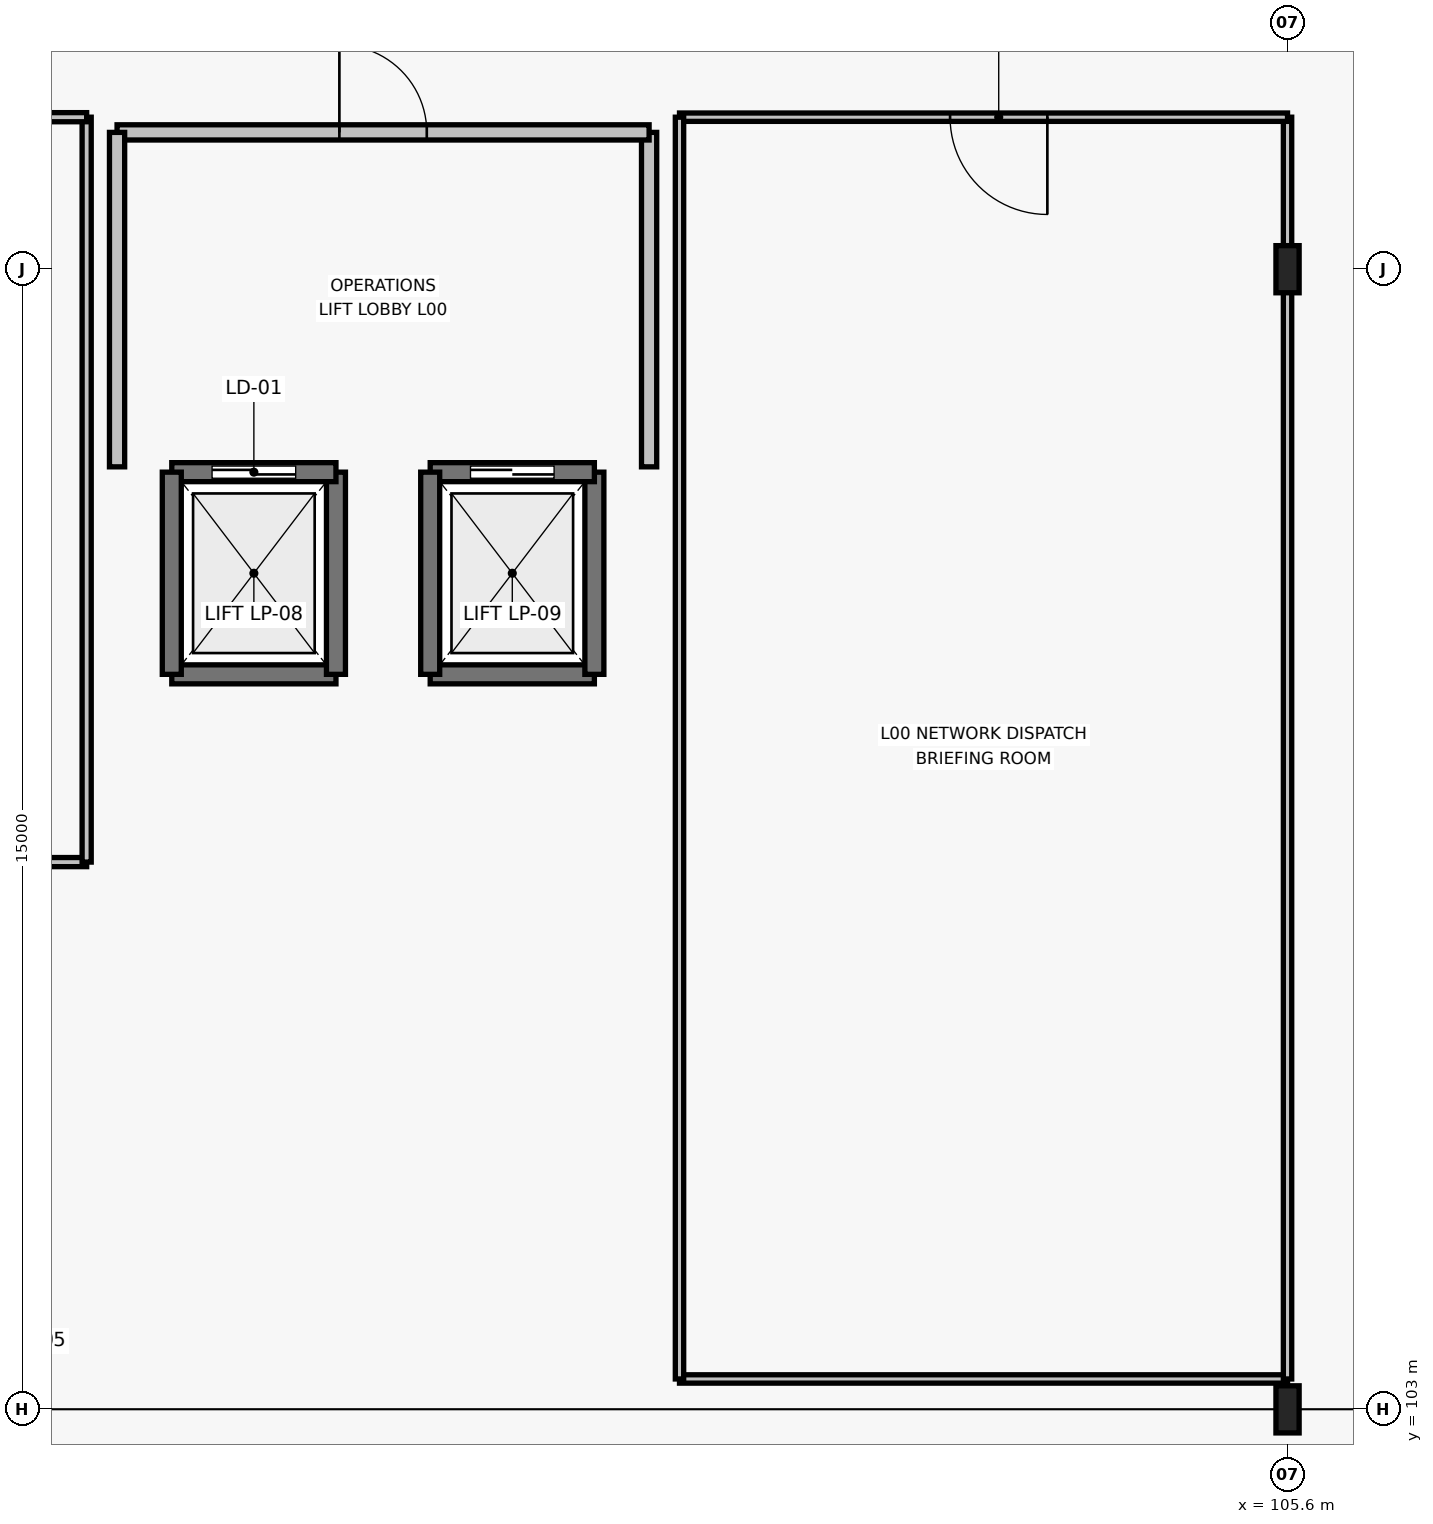
"""IFC4 building model, lengths in metres.
Left out: names, types, materials, properties, quantities, classifications, styles, units other than length and angle.
Written with IfcOpenShell. Run it as: python <this file> out.ifc"""

import sys

from ifc_helpers import new_model, si_unit, direction, frame, frame_2d, origin, origin_2d, place, context, subcontext, project, spatial, rectangle, i_section, extrude, element, fill, save


model = new_model("IFC4")
c1 = context("Model", 3, precision=1e-05, world=origin(), true_north=direction((0.0, 1.0)))
c2 = subcontext(c1, "Body", "Model", "MODEL_VIEW")
j1 = project(units=[si_unit("LENGTHUNIT", "METRE"), si_unit("PLANEANGLEUNIT", "RADIAN")], contexts=[c1])
p1 = place(None, origin())
s1 = spatial("IfcSite", under=j1, at=p1, CompositionType="ELEMENT")
p2 = place(p1, origin())
s2 = spatial("IfcBuilding", under=s1, at=p2, CompositionType="ELEMENT")
p3 = place(p2, origin())
s3 = spatial("IfcBuildingStorey", under=s2, at=p3, CompositionType="ELEMENT", Elevation=0.0)
for number, where, z_axis, x_axis in (
    (1, (105.6, 103.0, 0.0), (0.0, 0.0, 1.0), (1.0, 0.0, 0.0)),
    (2, (105.6, 118.0, 0.0), (0.0, 0.0, 1.0), (1.0, 0.0, 0.0)),
):
    element("IfcColumn", number, at=place(p3, frame(where, z_axis=z_axis, x_axis=x_axis)), inside=s3, PredefinedType="COLUMN", context=c2, shape_type="SweptSolid", body=[
        extrude(i_section(OverallWidth=0.305, OverallDepth=0.62, WebThickness=0.021, FlangeThickness=0.04, FilletRadius=0.027, at=origin_2d()), origin(), (0.0, 0.0, 1.0), 5.4),
    ])
p4 = place(p3, frame((90.92, 112.67, 0.0), z_axis=(0.0, 0.0, 1.0), x_axis=(1.0, 0.0, 0.0)))
e3 = element("IfcWall", 3, at=p4, inside=s3, PredefinedType="SHEAR", context=c2, shape_type="SweptSolid", body=[
    extrude(rectangle(XDim=2.16, YDim=0.25, at=frame_2d((1.08, 0.0))), origin(), (0.0, 0.0, 1.0), 5.16),
])
p5 = place(p3, frame((93.08, 112.67, 0.0), z_axis=(0.0, 0.0, 1.0), x_axis=(0.0, 1.0, 0.0)))
e4 = element("IfcWall", 4, at=p5, inside=s3, PredefinedType="SHEAR", context=c2, shape_type="SweptSolid", body=[
    extrude(rectangle(XDim=2.66, YDim=0.25, at=frame_2d((1.33, 0.0))), origin(), (0.0, 0.0, 1.0), 5.16),
])
p6 = place(p3, frame((93.08, 115.33, 0.0), z_axis=(0.0, 0.0, 1.0), x_axis=(-1.0, 0.0, 0.0)))
e5 = element("IfcWall", 5, at=p6, inside=s3, PredefinedType="SHEAR", context=c2, shape_type="SweptSolid", body=[
    extrude(rectangle(XDim=2.16, YDim=0.25, at=frame_2d((1.08, 0.0))), origin(), (0.0, 0.0, 1.0), 5.16),
])
p7 = place(p6, frame((0.53, 0.0, 0.0)))
e6 = element("IfcOpeningElement", 6, at=p7, cuts=e5, PredefinedType="OPENING", context=c2, shape_type="SweptSolid", body=[
    extrude(rectangle(XDim=1.1, YDim=2.2, at=frame_2d((0.55, 1.1))), frame((0.0, 0.135, 0.0), z_axis=(0.0, -1.0, 0.0), x_axis=(1.0, 0.0, 0.0)), (0.0, 0.0, 1.0), 0.27),
])
p8 = place(p3, frame((90.92, 115.33, 0.0), z_axis=(0.0, 0.0, 1.0), x_axis=(0.0, -1.0, 0.0)))
e7 = element("IfcWall", 7, at=p8, inside=s3, PredefinedType="SHEAR", context=c2, shape_type="SweptSolid", body=[
    extrude(rectangle(XDim=2.66, YDim=0.25, at=frame_2d((1.33, 0.0))), origin(), (0.0, 0.0, 1.0), 5.16),
])
p9 = place(p3, frame((94.32, 112.67, 0.0), z_axis=(0.0, 0.0, 1.0), x_axis=(1.0, 0.0, 0.0)))
e8 = element("IfcWall", 8, at=p9, inside=s3, PredefinedType="SHEAR", context=c2, shape_type="SweptSolid", body=[
    extrude(rectangle(XDim=2.16, YDim=0.25, at=frame_2d((1.08, 0.0))), origin(), (0.0, 0.0, 1.0), 5.16),
])
p10 = place(p3, frame((96.48, 112.67, 0.0), z_axis=(0.0, 0.0, 1.0), x_axis=(0.0, 1.0, 0.0)))
e9 = element("IfcWall", 9, at=p10, inside=s3, PredefinedType="SHEAR", context=c2, shape_type="SweptSolid", body=[
    extrude(rectangle(XDim=2.66, YDim=0.25, at=frame_2d((1.33, 0.0))), origin(), (0.0, 0.0, 1.0), 5.16),
])
p11 = place(p3, frame((96.48, 115.33, 0.0), z_axis=(0.0, 0.0, 1.0), x_axis=(-1.0, 0.0, 0.0)))
e10 = element("IfcWall", 10, at=p11, inside=s3, PredefinedType="SHEAR", context=c2, shape_type="SweptSolid", body=[
    extrude(rectangle(XDim=2.16, YDim=0.25, at=frame_2d((1.08, 0.0))), origin(), (0.0, 0.0, 1.0), 5.16),
])
p12 = place(p11, frame((0.53, 0.0, 0.0)))
e11 = element("IfcOpeningElement", 11, at=p12, cuts=e10, PredefinedType="OPENING", context=c2, shape_type="SweptSolid", body=[
    extrude(rectangle(XDim=1.1, YDim=2.2, at=frame_2d((0.55, 1.1))), frame((0.0, 0.135, 0.0), z_axis=(0.0, -1.0, 0.0), x_axis=(1.0, 0.0, 0.0)), (0.0, 0.0, 1.0), 0.27),
])
p13 = place(p3, frame((94.32, 115.33, 0.0), z_axis=(0.0, 0.0, 1.0), x_axis=(0.0, -1.0, 0.0)))
e12 = element("IfcWall", 12, at=p13, inside=s3, PredefinedType="SHEAR", context=c2, shape_type="SweptSolid", body=[
    extrude(rectangle(XDim=2.66, YDim=0.25, at=frame_2d((1.33, 0.0))), origin(), (0.0, 0.0, 1.0), 5.16),
])
p14 = place(p3, frame((97.2, 115.4, 0.0), z_axis=(0.0, 0.0, 1.0), x_axis=(0.0, 1.0, 0.0)))
e13 = element("IfcWall", 13, at=p14, inside=s3, PredefinedType="PARTITIONING", context=c2, shape_type="SweptSolid", body=[
    extrude(rectangle(XDim=4.4, YDim=0.2, at=frame_2d((2.2, 0.0))), origin(), (0.0, 0.0, 1.0), 5.16),
])
p15 = place(p3, frame((97.2, 119.8, 0.0), z_axis=(0.0, 0.0, 1.0), x_axis=(-1.0, 0.0, 0.0)))
e14 = element("IfcWall", 14, at=p15, inside=s3, PredefinedType="PARTITIONING", context=c2, shape_type="SweptSolid", body=[
    extrude(rectangle(XDim=7.0, YDim=0.2, at=frame_2d((3.5, 0.0))), origin(), (0.0, 0.0, 1.0), 5.16),
])
p16 = place(p15, frame((2.925, 0.0, 0.0)))
e15 = element("IfcOpeningElement", 15, at=p16, cuts=e14, PredefinedType="OPENING", context=c2, shape_type="SweptSolid", body=[
    extrude(rectangle(XDim=1.15, YDim=2.2, at=frame_2d((0.575, 1.1))), frame((0.0, 0.11, 0.0), z_axis=(0.0, -1.0, 0.0), x_axis=(1.0, 0.0, 0.0)), (0.0, 0.0, 1.0), 0.22),
])
p17 = place(p3, frame((90.2, 119.8, 0.0), z_axis=(0.0, 0.0, 1.0), x_axis=(0.0, -1.0, 0.0)))
e16 = element("IfcWall", 16, at=p17, inside=s3, PredefinedType="PARTITIONING", context=c2, shape_type="SweptSolid", body=[
    extrude(rectangle(XDim=4.4, YDim=0.2, at=frame_2d((2.2, 0.0))), origin(), (0.0, 0.0, 1.0), 5.16),
])
p18 = place(p3, frame((82.6, 110.2, 0.0), z_axis=(0.0, 0.0, 1.0), x_axis=(1.0, 0.0, 0.0)))
e17 = element("IfcWall", 17, at=p18, inside=s3, PredefinedType="PARTITIONING", context=c2, shape_type="SweptSolid", body=[
    extrude(rectangle(XDim=7.2, YDim=0.12, at=frame_2d((3.6, 0.0))), origin(), (0.0, 0.0, 1.0), 5.16),
])
p19 = place(p3, frame((89.8, 110.2, 0.0), z_axis=(0.0, 0.0, 1.0), x_axis=(0.0, 1.0, 0.0)))
e18 = element("IfcWall", 18, at=p19, inside=s3, PredefinedType="PARTITIONING", context=c2, shape_type="SweptSolid", body=[
    extrude(rectangle(XDim=9.8, YDim=0.12, at=frame_2d((4.9, 0.0))), origin(), (0.0, 0.0, 1.0), 5.16),
])
p20 = place(p3, frame((89.8, 120.0, 0.0), z_axis=(0.0, 0.0, 1.0), x_axis=(-1.0, 0.0, 0.0)))
e19 = element("IfcWall", 19, at=p20, inside=s3, PredefinedType="PARTITIONING", context=c2, shape_type="SweptSolid", body=[
    extrude(rectangle(XDim=7.2, YDim=0.12, at=frame_2d((3.6, 0.0))), origin(), (0.0, 0.0, 1.0), 5.16),
])
p21 = place(p20, frame((3.21, 0.0, 0.0)))
e20 = element("IfcOpeningElement", 20, at=p21, cuts=e19, PredefinedType="OPENING", context=c2, shape_type="SweptSolid", body=[
    extrude(rectangle(XDim=1.18, YDim=2.18, at=frame_2d((0.59, 1.09))), frame((0.0, 0.07, 0.0), z_axis=(0.0, -1.0, 0.0), x_axis=(1.0, 0.0, 0.0)), (0.0, 0.0, 1.0), 0.14),
])
p22 = place(p3, frame((97.6, 103.4, 0.0), z_axis=(0.0, 0.0, 1.0), x_axis=(1.0, 0.0, 0.0)))
e21 = element("IfcWall", 21, at=p22, inside=s3, PredefinedType="MOVABLE", context=c2, shape_type="SweptSolid", body=[
    extrude(rectangle(XDim=8.0, YDim=0.11, at=frame_2d((4.0, 0.0))), origin(), (0.0, 0.0, 1.0), 4.765),
])
p23 = place(p3, frame((105.6, 103.4, 0.0), z_axis=(0.0, 0.0, 1.0), x_axis=(0.0, 1.0, 0.0)))
e22 = element("IfcWall", 22, at=p23, inside=s3, PredefinedType="MOVABLE", context=c2, shape_type="SweptSolid", body=[
    extrude(rectangle(XDim=16.6, YDim=0.11, at=frame_2d((8.3, 0.0))), origin(), (0.0, 0.0, 1.0), 4.655),
])
p24 = place(p3, frame((105.6, 120.0, 0.0), z_axis=(0.0, 0.0, 1.0), x_axis=(-1.0, 0.0, 0.0)))
e23 = element("IfcWall", 23, at=p24, inside=s3, PredefinedType="MOVABLE", context=c2, shape_type="SweptSolid", body=[
    extrude(rectangle(XDim=8.0, YDim=0.11, at=frame_2d((4.0, 0.0))), origin(), (0.0, 0.0, 1.0), 5.16),
])
p25 = place(p24, frame((3.16, 0.0, 0.0)))
e24 = element("IfcOpeningElement", 24, at=p25, cuts=e23, PredefinedType="OPENING", context=c2, shape_type="SweptSolid", body=[
    extrude(rectangle(XDim=1.28, YDim=2.22, at=frame_2d((0.64, 1.11))), frame((0.0, 0.065, 0.0), z_axis=(0.0, -1.0, 0.0), x_axis=(1.0, 0.0, 0.0)), (0.0, 0.0, 1.0), 0.13),
])
p26 = place(p3, frame((97.6, 120.0, 0.0), z_axis=(0.0, 0.0, 1.0), x_axis=(0.0, -1.0, 0.0)))
e25 = element("IfcWall", 25, at=p26, inside=s3, PredefinedType="MOVABLE", context=c2, shape_type="SweptSolid", body=[
    extrude(rectangle(XDim=16.6, YDim=0.11, at=frame_2d((8.3, 0.0))), origin(), (0.0, 0.0, 1.0), 5.16),
])
p27 = place(p7, origin())
e26 = element("IfcDoor", 26, at=p27, inside=s3, OperationType="SLIDING_TO_RIGHT", PredefinedType="DOOR", context=c2, shape_type="SweptSolid", body=[
    extrude(rectangle(XDim=1.1, YDim=2.2, at=frame_2d((0.55, 1.1))), frame((0.0, 0.025, 0.0), z_axis=(0.0, -1.0, 0.0), x_axis=(1.0, 0.0, 0.0)), (0.0, 0.0, 1.0), 0.05),
])
fill(e6, e26)
p28 = place(p12, origin())
e27 = element("IfcDoor", 27, at=p28, inside=s3, OperationType="SLIDING_TO_RIGHT", PredefinedType="DOOR", context=c2, shape_type="SweptSolid", body=[
    extrude(rectangle(XDim=1.1, YDim=2.2, at=frame_2d((0.55, 1.1))), frame((0.0, 0.025, 0.0), z_axis=(0.0, -1.0, 0.0), x_axis=(1.0, 0.0, 0.0)), (0.0, 0.0, 1.0), 0.05),
])
fill(e11, e27)
p29 = place(p16, origin())
e28 = element("IfcDoor", 28, at=p29, inside=s3, OperationType="SINGLE_SWING_RIGHT", PredefinedType="DOOR", context=c2, shape_type="SweptSolid", body=[
    extrude(rectangle(XDim=1.15, YDim=2.2, at=frame_2d((0.575, 1.1))), frame((0.0, 0.025, 0.0), z_axis=(0.0, -1.0, 0.0), x_axis=(1.0, 0.0, 0.0)), (0.0, 0.0, 1.0), 0.05),
])
fill(e15, e28)
p30 = place(p25, origin())
e29 = element("IfcDoor", 29, at=p30, inside=s3, OperationType="SINGLE_SWING_LEFT", PredefinedType="DOOR", context=c2, shape_type="SweptSolid", body=[
    extrude(rectangle(XDim=1.28, YDim=2.22, at=frame_2d((0.64, 1.11))), frame((0.0, 0.025, 0.0), z_axis=(0.0, -1.0, 0.0), x_axis=(1.0, 0.0, 0.0)), (0.0, 0.0, 1.0), 0.05),
])
fill(e24, e29)
save(model, sys.argv[1])
